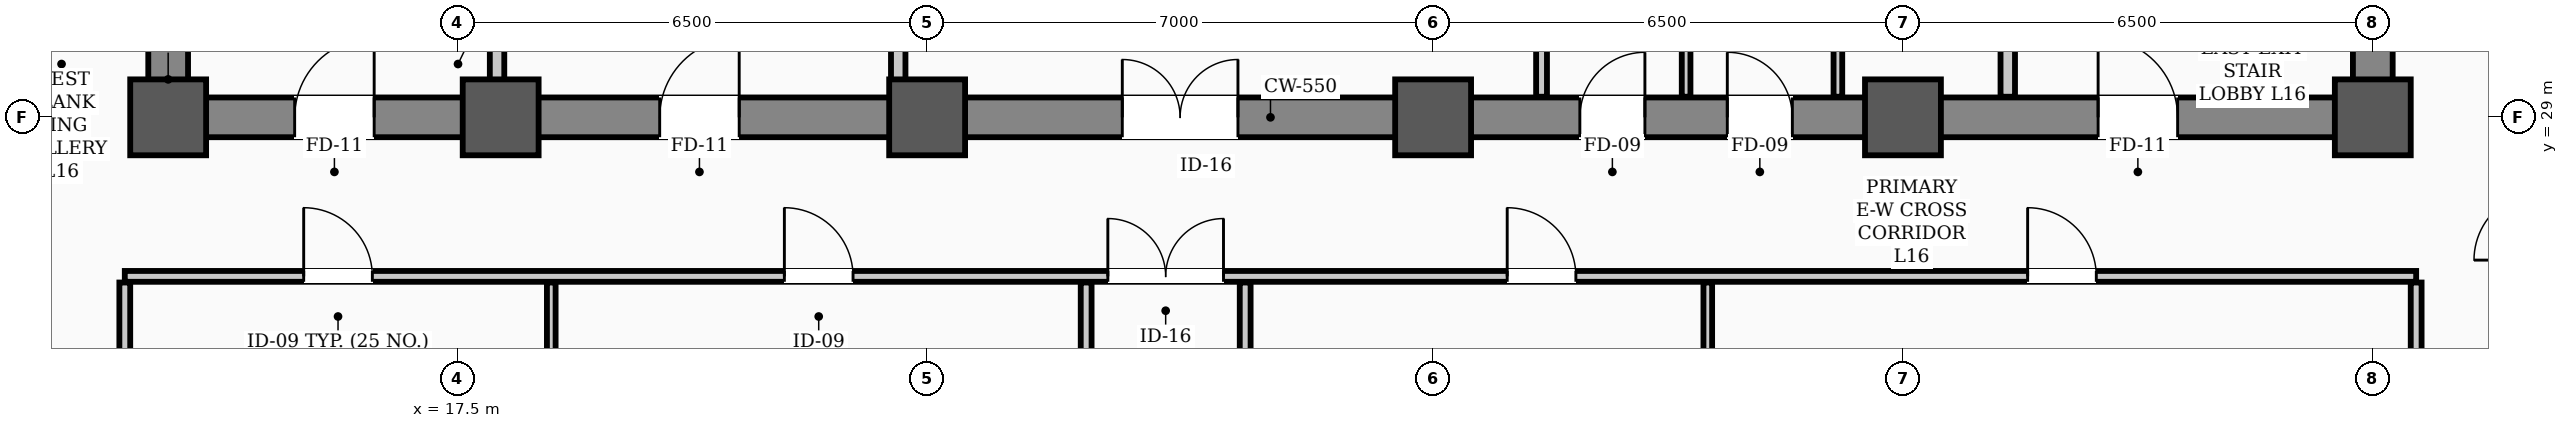
"""IFC4 building model, lengths in metres.
Left out: names, types, materials, properties, quantities, classifications, styles, units other than length and angle.
Written with IfcOpenShell. Run it as: python <this file> out.ifc"""

import sys

from ifc_helpers import new_model, si_unit, direction, frame, frame_2d, origin, origin_2d, place, context, subcontext, project, spatial, rectangle, hollow_rectangle, extrude, element, fill, save


model = new_model("IFC4")
c1 = context("Model", 3, precision=1e-05, world=origin(), true_north=direction((0.0, 1.0)))
c2 = subcontext(c1, "Body", "Model", "MODEL_VIEW")
j1 = project(units=[si_unit("LENGTHUNIT", "METRE"), si_unit("PLANEANGLEUNIT", "RADIAN")], contexts=[c1])
p1 = place(None, origin())
s1 = spatial("IfcSite", under=j1, at=p1, CompositionType="ELEMENT")
p2 = place(p1, origin())
s2 = spatial("IfcBuilding", under=s1, at=p2, CompositionType="ELEMENT")
p3 = place(p2, frame((0.0, 0.0, 65.5)))
s3 = spatial("IfcBuildingStorey", under=s2, at=p3, CompositionType="ELEMENT", Elevation=65.5)
for number, where, z_axis, x_axis in (
    (1, (13.5, 29.0, 0.0), (0.0, 0.0, 1.0), (1.0, 0.0, 0.0)),
    (2, (18.1, 29.0, 0.0), (0.0, 0.0, 1.0), (1.0, 0.0, 0.0)),
    (3, (24.0, 29.0, 0.0), (0.0, 0.0, 1.0), (1.0, 0.0, 0.0)),
    (4, (31.0, 29.0, 0.0), (0.0, 0.0, 1.0), (1.0, 0.0, 0.0)),
    (5, (37.5, 29.0, 0.0), (0.0, 0.0, 1.0), (1.0, 0.0, 0.0)),
    (6, (44.0, 29.0, 0.0), (0.0, 0.0, 1.0), (1.0, 0.0, 0.0)),
):
    element("IfcColumn", number, at=place(p3, frame(where, z_axis=z_axis, x_axis=x_axis)), inside=s3, PredefinedType="COLUMN", context=c2, shape_type="SweptSolid", body=[
        extrude(hollow_rectangle(XDim=1.05, YDim=1.05, WallThickness=0.038, InnerFilletRadius=0.019, OuterFilletRadius=0.057, at=origin_2d()), origin(), (0.0, 0.0, 1.0), 3.9),
    ])
p4 = place(p3, frame((13.5, 29.0, 0.0), z_axis=(0.0, 0.0, 1.0), x_axis=(1.0, 0.0, 0.0)))
e7 = element("IfcWall", 7, at=p4, inside=s3, PredefinedType="SHEAR", context=c2, shape_type="SweptSolid", body=[
    extrude(rectangle(XDim=30.5, YDim=0.55, at=frame_2d((15.25, 0.0))), origin(), (0.0, 0.0, 1.0), 3.72),
])
p5 = place(p4, frame((1.75, 0.0, 0.0)))
e8 = element("IfcOpeningElement", 8, at=p5, cuts=e7, PredefinedType="OPENING", context=c2, shape_type="SweptSolid", body=[
    extrude(rectangle(XDim=1.1, YDim=2.08, at=frame_2d((0.55, 1.04))), frame((0.0, 0.285, 0.0), z_axis=(0.0, -1.0, 0.0), x_axis=(1.0, 0.0, 0.0)), (0.0, 0.0, 1.0), 0.57),
])
p6 = place(p4, frame((26.7, 0.0, 0.0)))
e9 = element("IfcOpeningElement", 9, at=p6, cuts=e7, PredefinedType="OPENING", context=c2, shape_type="SweptSolid", body=[
    extrude(rectangle(XDim=1.1, YDim=2.08, at=frame_2d((0.55, 1.04))), frame((0.0, 0.285, 0.0), z_axis=(0.0, -1.0, 0.0), x_axis=(1.0, 0.0, 0.0)), (0.0, 0.0, 1.0), 0.57),
])
p7 = place(p4, frame((6.8, 0.0, 0.0)))
e10 = element("IfcOpeningElement", 10, at=p7, cuts=e7, PredefinedType="OPENING", context=c2, shape_type="SweptSolid", body=[
    extrude(rectangle(XDim=1.1, YDim=2.08, at=frame_2d((0.55, 1.04))), frame((0.0, 0.285, 0.0), z_axis=(0.0, -1.0, 0.0), x_axis=(1.0, 0.0, 0.0)), (0.0, 0.0, 1.0), 0.57),
])
p8 = place(p4, frame((13.2, 0.0, 0.0)))
e11 = element("IfcOpeningElement", 11, at=p8, cuts=e7, PredefinedType="OPENING", context=c2, shape_type="SweptSolid", body=[
    extrude(rectangle(XDim=1.6, YDim=2.08, at=frame_2d((0.8, 1.04))), frame((0.0, 0.285, 0.0), z_axis=(0.0, -1.0, 0.0), x_axis=(1.0, 0.0, 0.0)), (0.0, 0.0, 1.0), 0.57),
])
p9 = place(p4, frame((19.53, 0.0, 0.0)))
e12 = element("IfcOpeningElement", 12, at=p9, cuts=e7, PredefinedType="OPENING", context=c2, shape_type="SweptSolid", body=[
    extrude(rectangle(XDim=0.9, YDim=2.08, at=frame_2d((0.45, 1.04))), frame((0.0, 0.285, 0.0), z_axis=(0.0, -1.0, 0.0), x_axis=(1.0, 0.0, 0.0)), (0.0, 0.0, 1.0), 0.57),
])
p10 = place(p4, frame((21.57, 0.0, 0.0)))
e13 = element("IfcOpeningElement", 13, at=p10, cuts=e7, PredefinedType="OPENING", context=c2, shape_type="SweptSolid", body=[
    extrude(rectangle(XDim=0.9, YDim=2.08, at=frame_2d((0.45, 1.04))), frame((0.0, 0.285, 0.0), z_axis=(0.0, -1.0, 0.0), x_axis=(1.0, 0.0, 0.0)), (0.0, 0.0, 1.0), 0.57),
])
for number, where, z_axis, x_axis in (
    (14, (13.5, 29.35, 0.0), (0.0, 0.0, 1.0), (0.0, 1.0, 0.0)),
    (15, (44.0, 29.35, 0.0), (0.0, 0.0, 1.0), (0.0, 1.0, 0.0)),
):
    element("IfcWall", number, at=place(p3, frame(where, z_axis=z_axis, x_axis=x_axis)), inside=s3, PredefinedType="SHEAR", context=c2, shape_type="SweptSolid", body=[
        extrude(rectangle(XDim=8.6, YDim=0.55, at=frame_2d((4.3, 0.0))), origin(), (0.0, 0.0, 1.0), 3.72),
    ])
p11 = place(p3, frame((12.9, 26.8, 0.0), z_axis=(0.0, 0.0, 1.0), x_axis=(1.0, 0.0, 0.0)))
e16 = element("IfcWall", 16, at=p11, inside=s3, PredefinedType="PARTITIONING", context=c2, shape_type="SweptSolid", body=[
    extrude(rectangle(XDim=31.7, YDim=0.15, at=frame_2d((15.85, 0.0))), origin(), (0.0, 0.0, 1.0), 3.1),
])
p12 = place(p11, frame((13.6, 0.0, 0.0)))
e17 = element("IfcOpeningElement", 17, at=p12, cuts=e16, PredefinedType="OPENING", context=c2, shape_type="SweptSolid", body=[
    extrude(rectangle(XDim=1.6, YDim=2.08, at=frame_2d((0.8, 1.04))), frame((0.0, 0.085, 0.0), z_axis=(0.0, -1.0, 0.0), x_axis=(1.0, 0.0, 0.0)), (0.0, 0.0, 1.0), 0.17),
])
p13 = place(p11, frame((2.475, 0.0, 0.0)))
e18 = element("IfcOpeningElement", 18, at=p13, cuts=e16, PredefinedType="OPENING", context=c2, shape_type="SweptSolid", body=[
    extrude(rectangle(XDim=0.95, YDim=2.08, at=frame_2d((0.475, 1.04))), frame((0.0, 0.085, 0.0), z_axis=(0.0, -1.0, 0.0), x_axis=(1.0, 0.0, 0.0)), (0.0, 0.0, 1.0), 0.17),
])
p14 = place(p11, frame((9.125, 0.0, 0.0)))
e19 = element("IfcOpeningElement", 19, at=p14, cuts=e16, PredefinedType="OPENING", context=c2, shape_type="SweptSolid", body=[
    extrude(rectangle(XDim=0.95, YDim=2.08, at=frame_2d((0.475, 1.04))), frame((0.0, 0.085, 0.0), z_axis=(0.0, -1.0, 0.0), x_axis=(1.0, 0.0, 0.0)), (0.0, 0.0, 1.0), 0.17),
])
p15 = place(p11, frame((19.125, 0.0, 0.0)))
e20 = element("IfcOpeningElement", 20, at=p15, cuts=e16, PredefinedType="OPENING", context=c2, shape_type="SweptSolid", body=[
    extrude(rectangle(XDim=0.95, YDim=2.08, at=frame_2d((0.475, 1.04))), frame((0.0, 0.085, 0.0), z_axis=(0.0, -1.0, 0.0), x_axis=(1.0, 0.0, 0.0)), (0.0, 0.0, 1.0), 0.17),
])
p16 = place(p11, frame((26.325, 0.0, 0.0)))
e21 = element("IfcOpeningElement", 21, at=p16, cuts=e16, PredefinedType="OPENING", context=c2, shape_type="SweptSolid", body=[
    extrude(rectangle(XDim=0.95, YDim=2.08, at=frame_2d((0.475, 1.04))), frame((0.0, 0.085, 0.0), z_axis=(0.0, -1.0, 0.0), x_axis=(1.0, 0.0, 0.0)), (0.0, 0.0, 1.0), 0.17),
])
for number, where, z_axis, x_axis in (
    (22, (18.05, 29.285, 0.0), (0.0, 0.0, 1.0), (0.0, 1.0, 0.0)),
    (23, (38.95, 29.285, 0.0), (0.0, 0.0, 1.0), (0.0, 1.0, 0.0)),
):
    element("IfcWall", number, at=place(p3, frame(where, z_axis=z_axis, x_axis=x_axis)), inside=s3, PredefinedType="STANDARD", context=c2, shape_type="SweptSolid", body=[
        extrude(rectangle(XDim=1.015, YDim=0.2, at=frame_2d((0.508, 0.0))), origin(), (0.0, 0.0, 1.0), 3.3),
    ])
p17 = place(p3, frame((23.6, 29.285, 0.0), z_axis=(0.0, 0.0, 1.0), x_axis=(0.0, 1.0, 0.0)))
e24 = element("IfcWall", 24, at=p17, inside=s3, PredefinedType="STANDARD", context=c2, shape_type="SweptSolid", body=[
    extrude(rectangle(XDim=5.415, YDim=0.2, at=frame_2d((2.708, 0.0))), origin(), (0.0, 0.0, 1.0), 3.1),
])
p18 = place(p3, frame((32.5, 29.285, 0.0), z_axis=(0.0, 0.0, 1.0), x_axis=(0.0, 1.0, 0.0)))
e25 = element("IfcWall", 25, at=p18, inside=s3, PredefinedType="PARTITIONING", context=c2, shape_type="SweptSolid", body=[
    extrude(rectangle(XDim=2.48, YDim=0.15, at=frame_2d((1.24, 0.0))), origin(), (0.0, 0.0, 1.0), 3.3),
])
for number, where, z_axis, x_axis in (
    (26, (36.6, 29.285, 0.0), (0.0, 0.0, 1.0), (0.0, 1.0, 0.0)),
    (27, (34.5, 29.285, 0.0), (0.0, 0.0, 1.0), (0.0, 1.0, 0.0)),
):
    element("IfcWall", number, at=place(p3, frame(where, z_axis=z_axis, x_axis=x_axis)), inside=s3, PredefinedType="PARTITIONING", context=c2, shape_type="SweptSolid", body=[
        extrude(rectangle(XDim=2.48, YDim=0.12, at=frame_2d((1.24, 0.0))), origin(), (0.0, 0.0, 1.0), 3.3),
    ])
for number, where, z_axis, x_axis in (
    (28, (26.2, 19.335, 0.0), (0.0, 0.0, 1.0), (0.0, 1.0, 0.0)),
    (29, (28.4, 19.335, 0.0), (0.0, 0.0, 1.0), (0.0, 1.0, 0.0)),
    (30, (12.9, 19.335, 0.0), (0.0, 0.0, 1.0), (0.0, 1.0, 0.0)),
    (31, (44.6, 19.335, 0.0), (0.0, 0.0, 1.0), (0.0, 1.0, 0.0)),
):
    element("IfcWall", number, at=place(p3, frame(where, z_axis=z_axis, x_axis=x_axis)), inside=s3, PredefinedType="PARTITIONING", context=c2, shape_type="SweptSolid", body=[
        extrude(rectangle(XDim=7.38, YDim=0.15, at=frame_2d((3.69, 0.0))), origin(), (0.0, 0.0, 1.0), 3.0),
    ])
for number, where, z_axis, x_axis in (
    (32, (18.8, 19.335, 0.0), (0.0, 0.0, 1.0), (0.0, 1.0, 0.0)),
    (33, (34.8, 19.335, 0.0), (0.0, 0.0, 1.0), (0.0, 1.0, 0.0)),
):
    element("IfcWall", number, at=place(p3, frame(where, z_axis=z_axis, x_axis=x_axis)), inside=s3, PredefinedType="PARTITIONING", context=c2, shape_type="SweptSolid", body=[
        extrude(rectangle(XDim=7.38, YDim=0.12, at=frame_2d((3.69, 0.0))), origin(), (0.0, 0.0, 1.0), 3.0),
    ])
p19 = place(p5, origin())
e34 = element("IfcDoor", 34, at=p19, inside=s3, OperationType="SINGLE_SWING_RIGHT", PredefinedType="DOOR", context=c2, shape_type="SweptSolid", body=[
    extrude(rectangle(XDim=1.1, YDim=2.08, at=frame_2d((0.55, 1.04))), frame((0.0, 0.025, 0.0), z_axis=(0.0, -1.0, 0.0), x_axis=(1.0, 0.0, 0.0)), (0.0, 0.0, 1.0), 0.05),
])
fill(e8, e34)
p20 = place(p6, origin())
e35 = element("IfcDoor", 35, at=p20, inside=s3, OperationType="SINGLE_SWING_LEFT", PredefinedType="DOOR", context=c2, shape_type="SweptSolid", body=[
    extrude(rectangle(XDim=1.1, YDim=2.08, at=frame_2d((0.55, 1.04))), frame((0.0, 0.025, 0.0), z_axis=(0.0, -1.0, 0.0), x_axis=(1.0, 0.0, 0.0)), (0.0, 0.0, 1.0), 0.05),
])
fill(e9, e35)
p21 = place(p7, origin())
e36 = element("IfcDoor", 36, at=p21, inside=s3, OperationType="SINGLE_SWING_RIGHT", PredefinedType="DOOR", context=c2, shape_type="SweptSolid", body=[
    extrude(rectangle(XDim=1.1, YDim=2.08, at=frame_2d((0.55, 1.04))), frame((0.0, 0.025, 0.0), z_axis=(0.0, -1.0, 0.0), x_axis=(1.0, 0.0, 0.0)), (0.0, 0.0, 1.0), 0.05),
])
fill(e10, e36)
p22 = place(p8, origin())
e37 = element("IfcDoor", 37, at=p22, inside=s3, OperationType="DOUBLE_DOOR_SINGLE_SWING", PredefinedType="DOOR", context=c2, shape_type="SweptSolid", body=[
    extrude(rectangle(XDim=1.6, YDim=2.08, at=frame_2d((0.8, 1.04))), frame((0.0, 0.025, 0.0), z_axis=(0.0, -1.0, 0.0), x_axis=(1.0, 0.0, 0.0)), (0.0, 0.0, 1.0), 0.05),
])
fill(e11, e37)
p23 = place(p9, origin())
e38 = element("IfcDoor", 38, at=p23, inside=s3, OperationType="SINGLE_SWING_RIGHT", PredefinedType="DOOR", context=c2, shape_type="SweptSolid", body=[
    extrude(rectangle(XDim=0.9, YDim=2.08, at=frame_2d((0.45, 1.04))), frame((0.0, 0.025, 0.0), z_axis=(0.0, -1.0, 0.0), x_axis=(1.0, 0.0, 0.0)), (0.0, 0.0, 1.0), 0.05),
])
fill(e12, e38)
p24 = place(p10, origin())
e39 = element("IfcDoor", 39, at=p24, inside=s3, OperationType="SINGLE_SWING_LEFT", PredefinedType="DOOR", context=c2, shape_type="SweptSolid", body=[
    extrude(rectangle(XDim=0.9, YDim=2.08, at=frame_2d((0.45, 1.04))), frame((0.0, 0.025, 0.0), z_axis=(0.0, -1.0, 0.0), x_axis=(1.0, 0.0, 0.0)), (0.0, 0.0, 1.0), 0.05),
])
fill(e13, e39)
p25 = place(p12, origin())
e40 = element("IfcDoor", 40, at=p25, inside=s3, OperationType="DOUBLE_DOOR_SINGLE_SWING", PredefinedType="DOOR", context=c2, shape_type="SweptSolid", body=[
    extrude(rectangle(XDim=1.6, YDim=2.08, at=frame_2d((0.8, 1.04))), frame((0.0, 0.025, 0.0), z_axis=(0.0, -1.0, 0.0), x_axis=(1.0, 0.0, 0.0)), (0.0, 0.0, 1.0), 0.05),
])
fill(e17, e40)
p26 = place(p13, origin())
e41 = element("IfcDoor", 41, at=p26, inside=s3, OperationType="SINGLE_SWING_LEFT", PredefinedType="DOOR", context=c2, shape_type="SweptSolid", body=[
    extrude(rectangle(XDim=0.95, YDim=2.08, at=frame_2d((0.475, 1.04))), frame((0.0, 0.025, 0.0), z_axis=(0.0, -1.0, 0.0), x_axis=(1.0, 0.0, 0.0)), (0.0, 0.0, 1.0), 0.05),
])
fill(e18, e41)
p27 = place(p14, origin())
e42 = element("IfcDoor", 42, at=p27, inside=s3, OperationType="SINGLE_SWING_LEFT", PredefinedType="DOOR", context=c2, shape_type="SweptSolid", body=[
    extrude(rectangle(XDim=0.95, YDim=2.08, at=frame_2d((0.475, 1.04))), frame((0.0, 0.025, 0.0), z_axis=(0.0, -1.0, 0.0), x_axis=(1.0, 0.0, 0.0)), (0.0, 0.0, 1.0), 0.05),
])
fill(e19, e42)
p28 = place(p15, origin())
e43 = element("IfcDoor", 43, at=p28, inside=s3, OperationType="SINGLE_SWING_LEFT", PredefinedType="DOOR", context=c2, shape_type="SweptSolid", body=[
    extrude(rectangle(XDim=0.95, YDim=2.08, at=frame_2d((0.475, 1.04))), frame((0.0, 0.025, 0.0), z_axis=(0.0, -1.0, 0.0), x_axis=(1.0, 0.0, 0.0)), (0.0, 0.0, 1.0), 0.05),
])
fill(e20, e43)
p29 = place(p16, origin())
e44 = element("IfcDoor", 44, at=p29, inside=s3, OperationType="SINGLE_SWING_LEFT", PredefinedType="DOOR", context=c2, shape_type="SweptSolid", body=[
    extrude(rectangle(XDim=0.95, YDim=2.08, at=frame_2d((0.475, 1.04))), frame((0.0, 0.025, 0.0), z_axis=(0.0, -1.0, 0.0), x_axis=(1.0, 0.0, 0.0)), (0.0, 0.0, 1.0), 0.05),
])
fill(e21, e44)
save(model, sys.argv[1])
